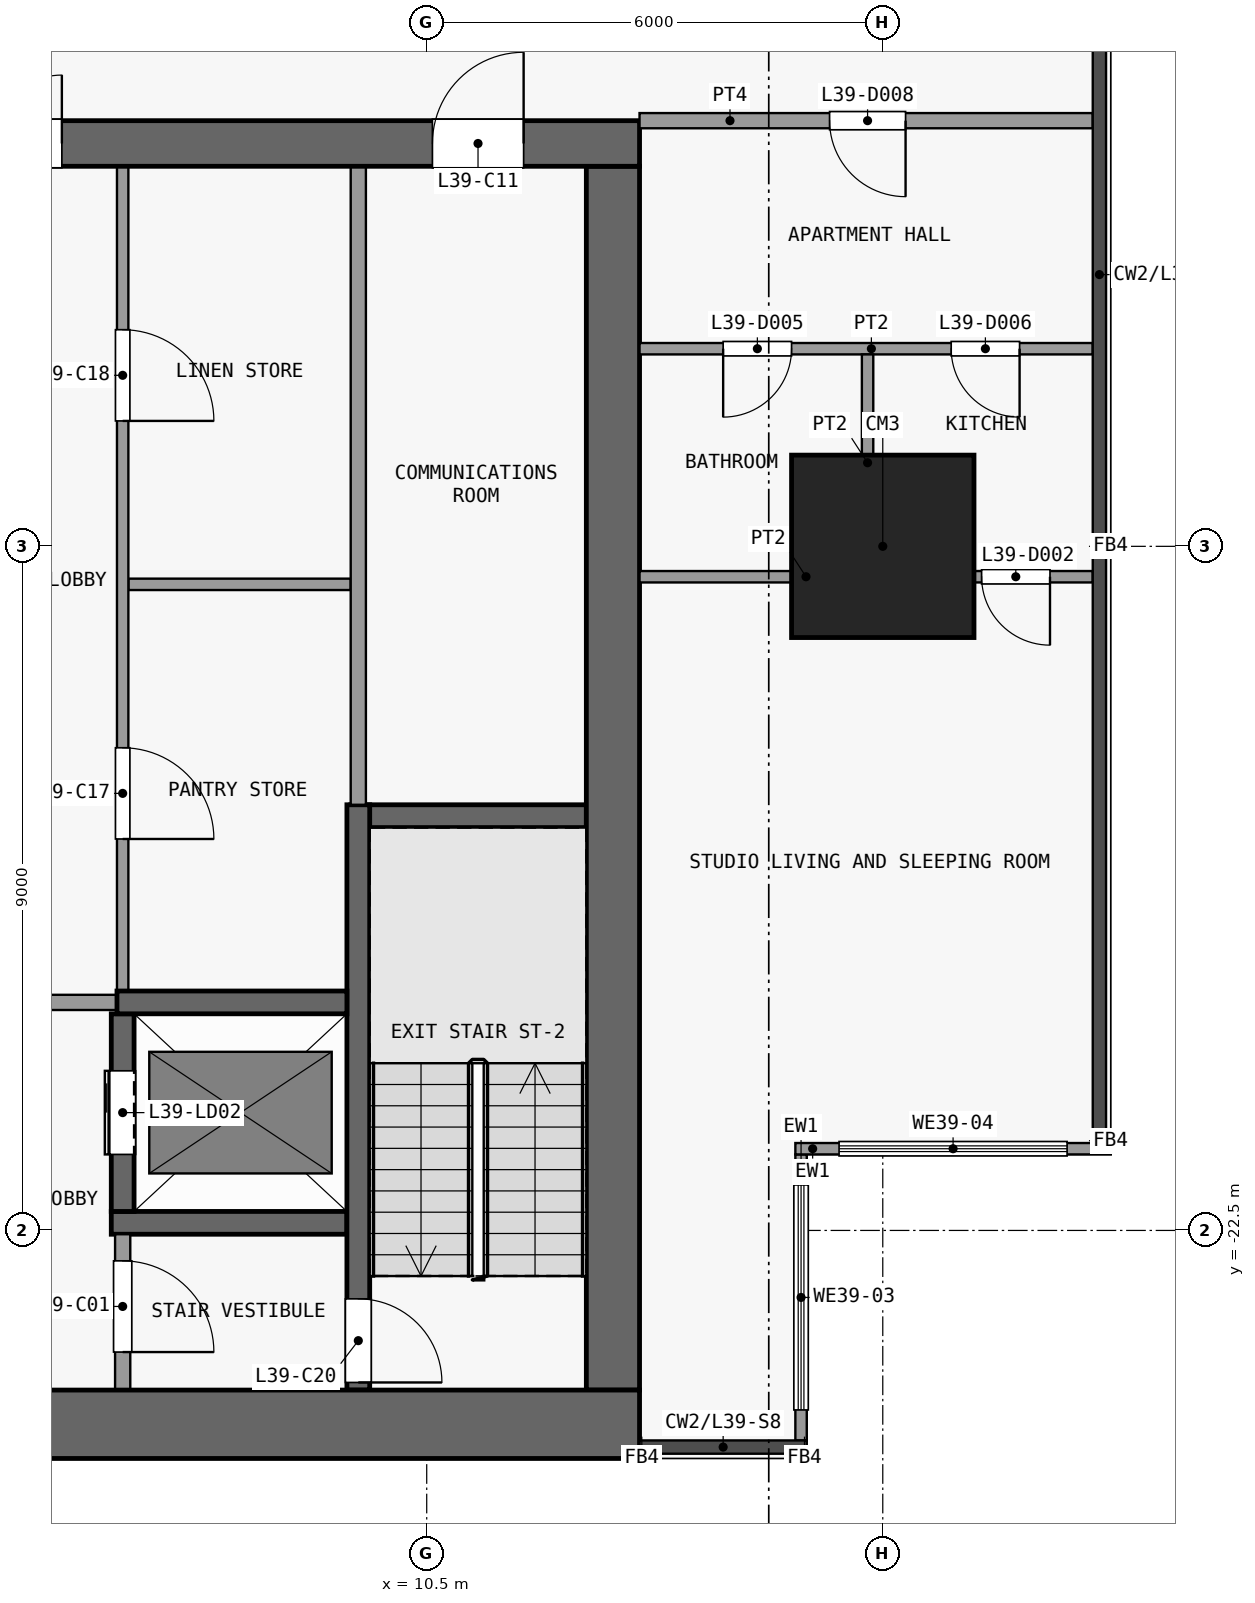
"""IFC4 building model, lengths in metres.
Left out: names, types, materials, properties, quantities, classifications, styles, units other than length and angle.
Written with IfcOpenShell. Run it as: python <this file> out.ifc"""

import sys

from ifc_helpers import new_model, si_unit, direction, frame, frame_2d, origin, origin_2d, place, context, subcontext, project, spatial, rectangle, extrude, element, fill, save


model = new_model("IFC4")
c1 = context("Model", 3, precision=1e-05, world=origin(), true_north=direction((0.0, 1.0)))
c2 = subcontext(c1, "Body", "Model", "MODEL_VIEW")
j1 = project(units=[si_unit("LENGTHUNIT", "METRE"), si_unit("PLANEANGLEUNIT", "RADIAN")], contexts=[c1])
p1 = place(None, origin())
s1 = spatial("IfcSite", under=j1, at=p1, CompositionType="ELEMENT")
p2 = place(p1, origin())
s2 = spatial("IfcBuilding", under=s1, at=p2, CompositionType="ELEMENT")
p3 = place(p2, frame((0.0, 0.0, 160.1)))
s3 = spatial("IfcBuildingStorey", under=s2, at=p3, CompositionType="ELEMENT", Elevation=160.1)
p4 = place(p3, frame((16.5, -13.5, 0.0), z_axis=(0.0, 0.0, 1.0), x_axis=(1.0, 0.0, 0.0)))
e1 = element("IfcColumn", 1, at=p4, inside=s3, PredefinedType="COLUMN", context=c2, shape_type="SweptSolid", body=[
    extrude(rectangle(XDim=2.4, YDim=2.4, at=origin_2d()), origin(), (0.0, 0.0, 1.0), 3.6),
])
p5 = place(p3, frame((-13.3, -25.05, 0.0), z_axis=(0.0, 0.0, 1.0), x_axis=(1.0, 0.0, 0.0)))
e2 = element("IfcWall", 2, at=p5, inside=s3, PredefinedType="SHEAR", context=c2, shape_type="SweptSolid", body=[
    extrude(rectangle(XDim=26.6, YDim=0.9, at=frame_2d((13.3, 0.0))), origin(), (0.0, 0.0, 1.0), 3.3),
])
p6 = place(p3, frame((-13.3, -8.2, 0.0), z_axis=(0.0, 0.0, 1.0), x_axis=(1.0, 0.0, 0.0)))
e3 = element("IfcWall", 3, at=p6, inside=s3, PredefinedType="SHEAR", context=c2, shape_type="SweptSolid", body=[
    extrude(rectangle(XDim=26.6, YDim=0.6, at=frame_2d((13.3, 0.0))), origin(), (0.0, 0.0, 1.0), 3.3),
])
p7 = place(p6, frame((7.6, 0.0, 0.0)))
e4 = element("IfcOpeningElement", 4, at=p7, cuts=e3, PredefinedType="OPENING", context=c2, shape_type="SweptSolid", body=[
    extrude(rectangle(XDim=1.8, YDim=2.1, at=frame_2d((0.9, 1.05))), frame((0.0, 0.31, 0.0), z_axis=(0.0, -1.0, 0.0), x_axis=(1.0, 0.0, 0.0)), (0.0, 0.0, 1.0), 0.62),
])
p8 = place(p6, frame((17.2, 0.0, 0.0)))
e5 = element("IfcOpeningElement", 5, at=p8, cuts=e3, PredefinedType="OPENING", context=c2, shape_type="SweptSolid", body=[
    extrude(rectangle(XDim=1.8, YDim=2.1, at=frame_2d((0.9, 1.05))), frame((0.0, 0.31, 0.0), z_axis=(0.0, -1.0, 0.0), x_axis=(1.0, 0.0, 0.0)), (0.0, 0.0, 1.0), 0.62),
])
p9 = place(p6, frame((2.525, 0.0, 0.0)))
e6 = element("IfcOpeningElement", 6, at=p9, cuts=e3, PredefinedType="OPENING", context=c2, shape_type="SweptSolid", body=[
    extrude(rectangle(XDim=0.9, YDim=2.1, at=frame_2d((0.45, 1.05))), frame((0.0, 0.31, 0.0), z_axis=(0.0, -1.0, 0.0), x_axis=(1.0, 0.0, 0.0)), (0.0, 0.0, 1.0), 0.62),
])
p10 = place(p6, frame((23.875, 0.0, 0.0)))
e7 = element("IfcOpeningElement", 7, at=p10, cuts=e3, PredefinedType="OPENING", context=c2, shape_type="SweptSolid", body=[
    extrude(rectangle(XDim=1.2, YDim=2.1, at=frame_2d((0.6, 1.05))), frame((0.0, 0.31, 0.0), z_axis=(0.0, -1.0, 0.0), x_axis=(1.0, 0.0, 0.0)), (0.0, 0.0, 1.0), 0.62),
])
p11 = place(p3, frame((12.95, -24.6, 0.0), z_axis=(0.0, 0.0, 1.0), x_axis=(0.0, 1.0, 0.0)))
e8 = element("IfcWall", 8, at=p11, inside=s3, PredefinedType="SHEAR", context=c2, shape_type="SweptSolid", body=[
    extrude(rectangle(XDim=16.1, YDim=0.7, at=frame_2d((8.05, 0.0))), origin(), (0.0, 0.0, 1.0), 3.3),
])
p12 = place(p3, frame((6.35, -22.4, 0.0), z_axis=(0.0, 0.0, 1.0), x_axis=(1.0, 0.0, 0.0)))
e9 = element("IfcWall", 9, at=p12, inside=s3, PredefinedType="SHEAR", context=c2, shape_type="SweptSolid", body=[
    extrude(rectangle(XDim=3.1, YDim=0.3, at=frame_2d((1.55, 0.0))), origin(), (0.0, 0.0, 1.0), 3.3),
])
p13 = place(p3, frame((6.575, -19.5, 0.0), z_axis=(0.0, 0.0, 1.0), x_axis=(-1.0, 0.0, 0.0)))
e10 = element("IfcWall", 10, at=p13, inside=s3, PredefinedType="PARTITIONING", context=c2, shape_type="SweptSolid", body=[
    extrude(rectangle(XDim=3.325, YDim=0.2, at=frame_2d((1.663, 0.0))), origin(), (0.0, 0.0, 1.0), 3.3),
])
p14 = place(p13, frame((1.025, 0.0, 0.0)))
e11 = element("IfcOpeningElement", 11, at=p14, cuts=e10, PredefinedType="OPENING", context=c2, shape_type="SweptSolid", body=[
    extrude(rectangle(XDim=1.5, YDim=2.1, at=frame_2d((0.75, 1.05))), frame((0.0, 0.11, 0.0), z_axis=(0.0, -1.0, 0.0), x_axis=(1.0, 0.0, 0.0)), (0.0, 0.0, 1.0), 0.22),
])
p15 = place(p3, frame((6.425, -19.5, 0.0), z_axis=(0.0, 0.0, 1.0), x_axis=(1.0, 0.0, 0.0)))
e12 = element("IfcWall", 12, at=p15, inside=s3, PredefinedType="SHEAR", context=c2, shape_type="SweptSolid", body=[
    extrude(rectangle(XDim=3.025, YDim=0.3, at=frame_2d((1.512, 0.0))), origin(), (0.0, 0.0, 1.0), 3.3),
])
p16 = place(p3, frame((9.5, -17.05, 0.0), z_axis=(0.0, 0.0, 1.0), x_axis=(1.0, 0.0, 0.0)))
e13 = element("IfcWall", 13, at=p16, inside=s3, PredefinedType="SHEAR", context=c2, shape_type="SweptSolid", body=[
    extrude(rectangle(XDim=3.1, YDim=0.3, at=frame_2d((1.55, 0.0))), origin(), (0.0, 0.0, 1.0), 3.3),
])
p17 = place(p3, frame((6.575, -14.0, 0.0), z_axis=(0.0, 0.0, 1.0), x_axis=(1.0, 0.0, 0.0)))
e14 = element("IfcWall", 14, at=p17, inside=s3, PredefinedType="PARTITIONING", context=c2, shape_type="SweptSolid", body=[
    extrude(rectangle(XDim=2.925, YDim=0.15, at=frame_2d((1.462, 0.0))), origin(), (0.0, 0.0, 1.0), 3.3),
])
p18 = place(p3, frame((6.5, -22.55, 0.0), z_axis=(0.0, 0.0, 1.0), x_axis=(0.0, -1.0, 0.0)))
e15 = element("IfcWall", 15, at=p18, inside=s3, PredefinedType="PARTITIONING", context=c2, shape_type="SweptSolid", body=[
    extrude(rectangle(XDim=2.05, YDim=0.2, at=frame_2d((1.025, 0.0))), origin(), (0.0, 0.0, 1.0), 3.3),
])
p19 = place(p18, frame((0.35, 0.0, 0.0)))
e16 = element("IfcOpeningElement", 16, at=p19, cuts=e15, PredefinedType="OPENING", context=c2, shape_type="SweptSolid", body=[
    extrude(rectangle(XDim=1.2, YDim=2.1, at=frame_2d((0.6, 1.05))), frame((0.0, 0.11, 0.0), z_axis=(0.0, -1.0, 0.0), x_axis=(1.0, 0.0, 0.0)), (0.0, 0.0, 1.0), 0.22),
])
p20 = place(p3, frame((6.5, -22.25, 0.0), z_axis=(0.0, 0.0, 1.0), x_axis=(0.0, 1.0, 0.0)))
e17 = element("IfcWall", 17, at=p20, inside=s3, PredefinedType="SHEAR", context=c2, shape_type="SweptSolid", body=[
    extrude(rectangle(XDim=2.6, YDim=0.3, at=frame_2d((1.3, 0.0))), origin(), (0.0, 0.0, 1.0), 3.3),
])
p21 = place(p20, frame((0.75, 0.0, 0.0)))
e18 = element("IfcOpeningElement", 18, at=p21, cuts=e17, PredefinedType="OPENING", context=c2, shape_type="SweptSolid", body=[
    extrude(rectangle(XDim=1.1, YDim=2.1, at=frame_2d((0.55, 1.05))), frame((0.0, 0.16, 0.0), z_axis=(0.0, -1.0, 0.0), x_axis=(1.0, 0.0, 0.0)), (0.0, 0.0, 1.0), 0.32),
])
p22 = place(p3, frame((6.5, -8.5, 0.0), z_axis=(0.0, 0.0, 1.0), x_axis=(0.0, -1.0, 0.0)))
e19 = element("IfcWall", 19, at=p22, inside=s3, PredefinedType="PARTITIONING", context=c2, shape_type="SweptSolid", body=[
    extrude(rectangle(XDim=10.85, YDim=0.15, at=frame_2d((5.425, 0.0))), origin(), (0.0, 0.0, 1.0), 3.3),
])
p23 = place(p22, frame((7.65, 0.0, 0.0)))
e20 = element("IfcOpeningElement", 20, at=p23, cuts=e19, PredefinedType="OPENING", context=c2, shape_type="SweptSolid", body=[
    extrude(rectangle(XDim=1.2, YDim=2.1, at=frame_2d((0.6, 1.05))), frame((0.0, 0.085, 0.0), z_axis=(0.0, -1.0, 0.0), x_axis=(1.0, 0.0, 0.0)), (0.0, 0.0, 1.0), 0.17),
])
p24 = place(p22, frame((2.15, 0.0, 0.0)))
e21 = element("IfcOpeningElement", 21, at=p24, cuts=e19, PredefinedType="OPENING", context=c2, shape_type="SweptSolid", body=[
    extrude(rectangle(XDim=1.2, YDim=2.1, at=frame_2d((0.6, 1.05))), frame((0.0, 0.085, 0.0), z_axis=(0.0, -1.0, 0.0), x_axis=(1.0, 0.0, 0.0)), (0.0, 0.0, 1.0), 0.17),
])
p25 = place(p3, frame((9.6, -16.9, 0.0), z_axis=(0.0, 0.0, 1.0), x_axis=(0.0, -1.0, 0.0)))
e22 = element("IfcWall", 22, at=p25, inside=s3, PredefinedType="SHEAR", context=c2, shape_type="SweptSolid", body=[
    extrude(rectangle(XDim=7.7, YDim=0.3, at=frame_2d((3.85, 0.0))), origin(), (0.0, 0.0, 1.0), 3.3),
])
p26 = place(p25, frame((6.5, 0.0, 0.0)))
e23 = element("IfcOpeningElement", 23, at=p26, cuts=e22, PredefinedType="OPENING", context=c2, shape_type="SweptSolid", body=[
    extrude(rectangle(XDim=1.1, YDim=2.1, at=frame_2d((0.55, 1.05))), frame((0.0, 0.16, 0.0), z_axis=(0.0, -1.0, 0.0), x_axis=(1.0, 0.0, 0.0)), (0.0, 0.0, 1.0), 0.32),
])
p27 = place(p3, frame((9.6, -16.9, 0.0), z_axis=(0.0, 0.0, 1.0), x_axis=(0.0, 1.0, 0.0)))
e24 = element("IfcWall", 24, at=p27, inside=s3, PredefinedType="PARTITIONING", context=c2, shape_type="SweptSolid", body=[
    extrude(rectangle(XDim=8.4, YDim=0.2, at=frame_2d((4.2, 0.0))), origin(), (0.0, 0.0, 1.0), 3.3),
])
p28 = place(p3, frame((15.425, -21.5, 0.0), z_axis=(0.0, 0.0, 1.0), x_axis=(0.0, -1.0, 0.0)))
e25 = element("IfcWall", 25, at=p28, inside=s3, PredefinedType="SOLIDWALL", context=c2, shape_type="SweptSolid", body=[
    extrude(rectangle(XDim=3.762, YDim=0.15, at=frame_2d((1.881, 0.0))), origin(), (0.0, 0.0, 1.0), 3.3),
])
p29 = place(p28, frame((0.401, 0.0, 0.9)))
e26 = element("IfcOpeningElement", 26, at=p29, cuts=e25, PredefinedType="OPENING", context=c2, shape_type="SweptSolid", body=[
    extrude(rectangle(XDim=2.96, YDim=2.4, at=frame_2d((1.48, 1.2))), frame((0.0, 0.085, 0.0), z_axis=(0.0, -1.0, 0.0), x_axis=(1.0, 0.0, 0.0)), (0.0, 0.0, 1.0), 0.17),
])
p30 = place(p3, frame((19.5, -21.425, 0.0), z_axis=(0.0, 0.0, 1.0), x_axis=(-1.0, 0.0, 0.0)))
e27 = element("IfcWall", 27, at=p30, inside=s3, PredefinedType="SOLIDWALL", context=c2, shape_type="SweptSolid", body=[
    extrude(rectangle(XDim=4.15, YDim=0.15, at=frame_2d((2.075, 0.0))), origin(), (0.0, 0.0, 1.0), 3.3),
])
p31 = place(p30, frame((0.575, 0.0, 0.9)))
e28 = element("IfcOpeningElement", 28, at=p31, cuts=e27, PredefinedType="OPENING", context=c2, shape_type="SweptSolid", body=[
    extrude(rectangle(XDim=3.0, YDim=2.4, at=frame_2d((1.5, 1.2))), frame((0.0, 0.085, 0.0), z_axis=(0.0, -1.0, 0.0), x_axis=(1.0, 0.0, 0.0)), (0.0, 0.0, 1.0), 0.17),
])
p32 = place(p3, frame((13.3, -13.9, 0.0), z_axis=(0.0, 0.0, 1.0), x_axis=(1.0, 0.0, 0.0)))
e29 = element("IfcWall", 29, at=p32, inside=s3, PredefinedType="PARTITIONING", context=c2, shape_type="SweptSolid", body=[
    extrude(rectangle(XDim=5.962, YDim=0.15, at=frame_2d((2.981, 0.0))), origin(), (0.0, 0.0, 1.0), 3.3),
])
p33 = place(p32, frame((4.5, 0.0, 0.0)))
e30 = element("IfcOpeningElement", 30, at=p33, cuts=e29, PredefinedType="OPENING", context=c2, shape_type="SweptSolid", body=[
    extrude(rectangle(XDim=0.9, YDim=2.1, at=frame_2d((0.45, 1.05))), frame((0.0, 0.085, 0.0), z_axis=(0.0, -1.0, 0.0), x_axis=(1.0, 0.0, 0.0)), (0.0, 0.0, 1.0), 0.17),
])
p34 = place(p3, frame((13.3, -10.9, 0.0), z_axis=(0.0, 0.0, 1.0), x_axis=(1.0, 0.0, 0.0)))
e31 = element("IfcWall", 31, at=p34, inside=s3, PredefinedType="PARTITIONING", context=c2, shape_type="SweptSolid", body=[
    extrude(rectangle(XDim=5.962, YDim=0.15, at=frame_2d((2.981, 0.0))), origin(), (0.0, 0.0, 1.0), 3.3),
])
p35 = place(p34, frame((1.1, 0.0, 0.0)))
e32 = element("IfcOpeningElement", 32, at=p35, cuts=e31, PredefinedType="OPENING", context=c2, shape_type="SweptSolid", body=[
    extrude(rectangle(XDim=0.9, YDim=2.1, at=frame_2d((0.45, 1.05))), frame((0.0, 0.085, 0.0), z_axis=(0.0, -1.0, 0.0), x_axis=(1.0, 0.0, 0.0)), (0.0, 0.0, 1.0), 0.17),
])
p36 = place(p34, frame((4.1, 0.0, 0.0)))
e33 = element("IfcOpeningElement", 33, at=p36, cuts=e31, PredefinedType="OPENING", context=c2, shape_type="SweptSolid", body=[
    extrude(rectangle(XDim=0.9, YDim=2.1, at=frame_2d((0.45, 1.05))), frame((0.0, 0.085, 0.0), z_axis=(0.0, -1.0, 0.0), x_axis=(1.0, 0.0, 0.0)), (0.0, 0.0, 1.0), 0.17),
])
p37 = place(p3, frame((13.3, -7.9, 0.0), z_axis=(0.0, 0.0, 1.0), x_axis=(1.0, 0.0, 0.0)))
e34 = element("IfcWall", 34, at=p37, inside=s3, PredefinedType="PARTITIONING", context=c2, shape_type="SweptSolid", body=[
    extrude(rectangle(XDim=5.962, YDim=0.2, at=frame_2d((2.981, 0.0))), origin(), (0.0, 0.0, 1.0), 3.3),
])
p38 = place(p37, frame((2.5, 0.0, 0.0)))
e35 = element("IfcOpeningElement", 35, at=p38, cuts=e34, PredefinedType="OPENING", context=c2, shape_type="SweptSolid", body=[
    extrude(rectangle(XDim=1.0, YDim=2.1, at=frame_2d((0.5, 1.05))), frame((0.0, 0.11, 0.0), z_axis=(0.0, -1.0, 0.0), x_axis=(1.0, 0.0, 0.0)), (0.0, 0.0, 1.0), 0.22),
])
p39 = place(p3, frame((16.3, -13.825, 0.0), z_axis=(0.0, 0.0, 1.0), x_axis=(0.0, 1.0, 0.0)))
e36 = element("IfcWall", 36, at=p39, inside=s3, PredefinedType="PARTITIONING", context=c2, shape_type="SweptSolid", body=[
    extrude(rectangle(XDim=2.85, YDim=0.15, at=frame_2d((1.425, 0.0))), origin(), (0.0, 0.0, 1.0), 3.3),
])
p40 = place(p21, origin())
e37 = element("IfcDoor", 37, at=p40, inside=s3, OperationType="DOUBLE_DOOR_SLIDING", PredefinedType="DOOR", context=c2, shape_type="SweptSolid", body=[
    extrude(rectangle(XDim=1.1, YDim=2.1, at=frame_2d((0.55, 1.05))), frame((0.0, 0.025, 0.0), z_axis=(0.0, -1.0, 0.0), x_axis=(1.0, 0.0, 0.0)), (0.0, 0.0, 1.0), 0.05),
])
fill(e18, e37)
p41 = place(p19, origin())
e38 = element("IfcDoor", 38, at=p41, inside=s3, OperationType="SINGLE_SWING_RIGHT", PredefinedType="DOOR", context=c2, shape_type="SweptSolid", body=[
    extrude(rectangle(XDim=1.2, YDim=2.1, at=frame_2d((0.6, 1.05))), frame((0.0, 0.025, 0.0), z_axis=(0.0, -1.0, 0.0), x_axis=(1.0, 0.0, 0.0)), (0.0, 0.0, 1.0), 0.05),
])
fill(e16, e38)
p42 = place(p8, origin())
e39 = element("IfcDoor", 39, at=p42, inside=s3, OperationType="DOUBLE_DOOR_SINGLE_SWING", PredefinedType="DOOR", context=c2, shape_type="SweptSolid", body=[
    extrude(rectangle(XDim=1.8, YDim=2.1, at=frame_2d((0.9, 1.05))), frame((0.0, 0.025, 0.0), z_axis=(0.0, -1.0, 0.0), x_axis=(1.0, 0.0, 0.0)), (0.0, 0.0, 1.0), 0.05),
])
fill(e5, e39)
p43 = place(p10, origin())
e40 = element("IfcDoor", 40, at=p43, inside=s3, OperationType="SINGLE_SWING_RIGHT", PredefinedType="DOOR", context=c2, shape_type="SweptSolid", body=[
    extrude(rectangle(XDim=1.2, YDim=2.1, at=frame_2d((0.6, 1.05))), frame((0.0, 0.025, 0.0), z_axis=(0.0, -1.0, 0.0), x_axis=(1.0, 0.0, 0.0)), (0.0, 0.0, 1.0), 0.05),
])
fill(e7, e40)
p44 = place(p23, origin())
e41 = element("IfcDoor", 41, at=p44, inside=s3, OperationType="SINGLE_SWING_RIGHT", PredefinedType="DOOR", context=c2, shape_type="SweptSolid", body=[
    extrude(rectangle(XDim=1.2, YDim=2.1, at=frame_2d((0.6, 1.05))), frame((0.0, 0.025, 0.0), z_axis=(0.0, -1.0, 0.0), x_axis=(1.0, 0.0, 0.0)), (0.0, 0.0, 1.0), 0.05),
])
fill(e20, e41)
p45 = place(p24, origin())
e42 = element("IfcDoor", 42, at=p45, inside=s3, OperationType="SINGLE_SWING_RIGHT", PredefinedType="DOOR", context=c2, shape_type="SweptSolid", body=[
    extrude(rectangle(XDim=1.2, YDim=2.1, at=frame_2d((0.6, 1.05))), frame((0.0, 0.025, 0.0), z_axis=(0.0, -1.0, 0.0), x_axis=(1.0, 0.0, 0.0)), (0.0, 0.0, 1.0), 0.05),
])
fill(e21, e42)
p46 = place(p26, origin())
e43 = element("IfcDoor", 43, at=p46, inside=s3, OperationType="SINGLE_SWING_RIGHT", PredefinedType="DOOR", context=c2, shape_type="SweptSolid", body=[
    extrude(rectangle(XDim=1.1, YDim=2.1, at=frame_2d((0.55, 1.05))), frame((0.0, 0.025, 0.0), z_axis=(0.0, -1.0, 0.0), x_axis=(1.0, 0.0, 0.0)), (0.0, 0.0, 1.0), 0.05),
])
fill(e23, e43)
p47 = place(p29, origin())
e44 = element("IfcWindow", 44, at=p47, inside=s3, PartitioningType="SINGLE_PANEL", PredefinedType="WINDOW", context=c2, shape_type="SweptSolid", body=[
    extrude(rectangle(XDim=2.96, YDim=2.4, at=frame_2d((1.48, 1.2))), frame((0.0, 0.03, 0.0), z_axis=(0.0, -1.0, 0.0), x_axis=(1.0, 0.0, 0.0)), (0.0, 0.0, 1.0), 0.06),
])
fill(e26, e44)
p48 = place(p31, origin())
e45 = element("IfcWindow", 45, at=p48, inside=s3, PartitioningType="SINGLE_PANEL", PredefinedType="WINDOW", context=c2, shape_type="SweptSolid", body=[
    extrude(rectangle(XDim=3.0, YDim=2.4, at=frame_2d((1.5, 1.2))), frame((0.0, 0.03, 0.0), z_axis=(0.0, -1.0, 0.0), x_axis=(1.0, 0.0, 0.0)), (0.0, 0.0, 1.0), 0.06),
])
fill(e28, e45)
p49 = place(p33, origin())
e46 = element("IfcDoor", 46, at=p49, inside=s3, OperationType="SINGLE_SWING_RIGHT", PredefinedType="DOOR", context=c2, shape_type="SweptSolid", body=[
    extrude(rectangle(XDim=0.9, YDim=2.1, at=frame_2d((0.45, 1.05))), frame((0.0, 0.025, 0.0), z_axis=(0.0, -1.0, 0.0), x_axis=(1.0, 0.0, 0.0)), (0.0, 0.0, 1.0), 0.05),
])
fill(e30, e46)
p50 = place(p35, origin())
e47 = element("IfcDoor", 47, at=p50, inside=s3, OperationType="SINGLE_SWING_LEFT", PredefinedType="DOOR", context=c2, shape_type="SweptSolid", body=[
    extrude(rectangle(XDim=0.9, YDim=2.1, at=frame_2d((0.45, 1.05))), frame((0.0, 0.025, 0.0), z_axis=(0.0, -1.0, 0.0), x_axis=(1.0, 0.0, 0.0)), (0.0, 0.0, 1.0), 0.05),
])
fill(e32, e47)
p51 = place(p36, origin())
e48 = element("IfcDoor", 48, at=p51, inside=s3, OperationType="SINGLE_SWING_RIGHT", PredefinedType="DOOR", context=c2, shape_type="SweptSolid", body=[
    extrude(rectangle(XDim=0.9, YDim=2.1, at=frame_2d((0.45, 1.05))), frame((0.0, 0.025, 0.0), z_axis=(0.0, -1.0, 0.0), x_axis=(1.0, 0.0, 0.0)), (0.0, 0.0, 1.0), 0.05),
])
fill(e33, e48)
p52 = place(p38, origin())
e49 = element("IfcDoor", 49, at=p52, inside=s3, OperationType="SINGLE_SWING_RIGHT", PredefinedType="DOOR", context=c2, shape_type="SweptSolid", body=[
    extrude(rectangle(XDim=1.0, YDim=2.1, at=frame_2d((0.5, 1.05))), frame((0.0, 0.025, 0.0), z_axis=(0.0, -1.0, 0.0), x_axis=(1.0, 0.0, 0.0)), (0.0, 0.0, 1.0), 0.05),
])
fill(e35, e49)
save(model, sys.argv[1])
